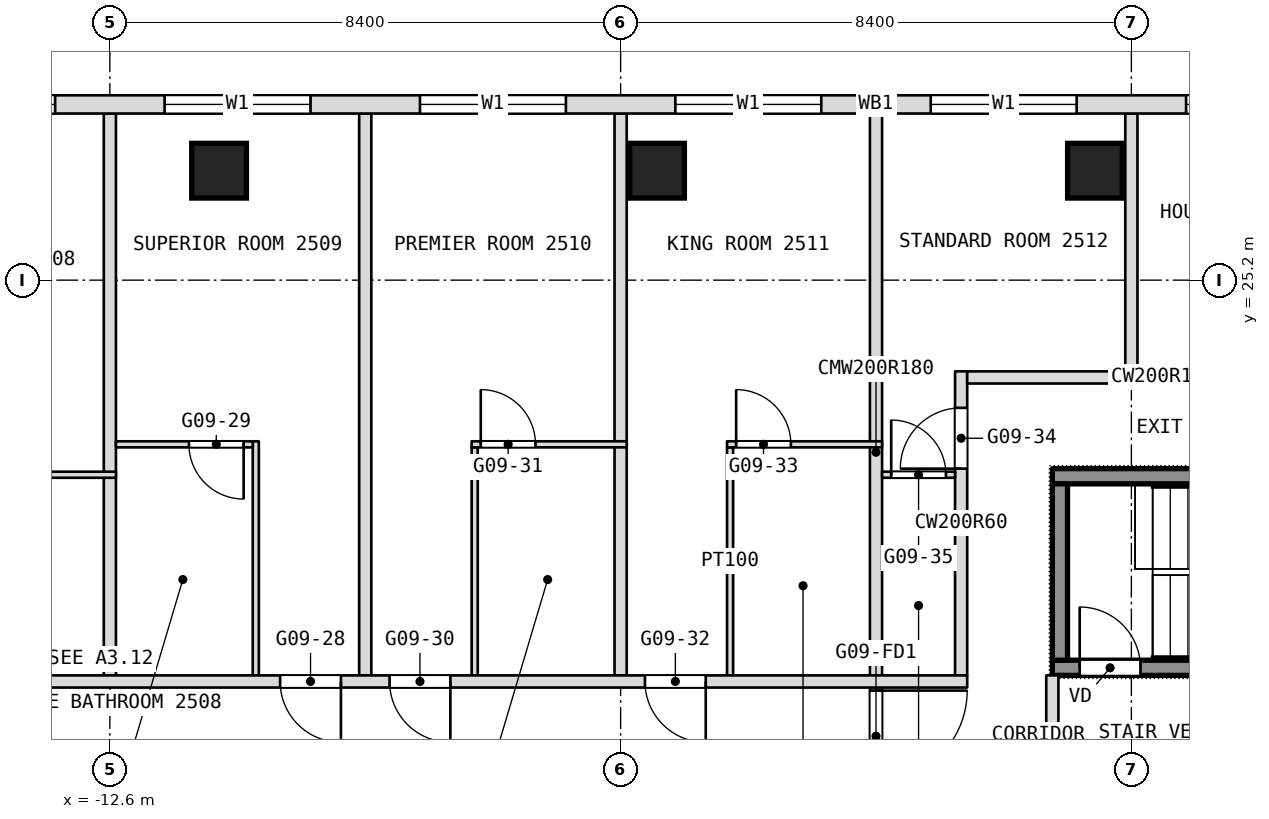
"""IFC4 building model, lengths in metres.
Left out: names, types, materials, properties, quantities, classifications, styles, units other than length and angle.
Written with IfcOpenShell. Run it as: python <this file> out.ifc"""

import sys

from ifc_helpers import new_model, si_unit, direction, frame, frame_2d, origin, origin_2d, place, context, subcontext, project, spatial, rectangle, extrude, element, fill, save


model = new_model("IFC4")
c1 = context("Model", 3, precision=1e-05, world=origin(), true_north=direction((0.0, 1.0)))
c2 = subcontext(c1, "Body", "Model", "MODEL_VIEW")
j1 = project(units=[si_unit("LENGTHUNIT", "METRE"), si_unit("PLANEANGLEUNIT", "RADIAN")], contexts=[c1])
p1 = place(None, origin())
s1 = spatial("IfcSite", under=j1, at=p1, CompositionType="ELEMENT")
p2 = place(p1, origin())
s2 = spatial("IfcBuilding", under=s1, at=p2, CompositionType="ELEMENT")
p3 = place(p2, frame((0.0, 0.0, 115.7)))
s3 = spatial("IfcBuildingStorey", under=s2, at=p3, CompositionType="ELEMENT", Elevation=115.7)
for number, where, z_axis, x_axis in (
    (1, (-10.804, 27.0, 0.0), (0.0, 0.0, 1.0), (1.0, 0.0, 0.0)),
    (2, (-3.601, 27.0, 0.0), (0.0, 0.0, 1.0), (1.0, 0.0, 0.0)),
    (3, (3.601, 27.0, 0.0), (0.0, 0.0, 1.0), (1.0, 0.0, 0.0)),
):
    element("IfcColumn", number, at=place(p3, frame(where, z_axis=z_axis, x_axis=x_axis)), inside=s3, PredefinedType="COLUMN", context=c2, shape_type="SweptSolid", body=[
        extrude(rectangle(XDim=0.9, YDim=0.9, at=origin_2d()), origin(), (0.0, 0.0, 1.0), 3.6),
    ])
p4 = place(p3, frame((4.2, 23.7, 0.0), z_axis=(0.0, 0.0, 1.0), x_axis=(0.0, 1.0, 0.0)))
e4 = element("IfcWall", 4, at=p4, inside=s3, PredefinedType="PARTITIONING", context=c2, shape_type="SweptSolid", body=[
    extrude(rectangle(XDim=4.24, YDim=0.2, at=frame_2d((2.12, 0.0))), origin(), (0.0, 0.0, 1.0), 3.34),
])
p5 = place(p3, frame((2.9, 16.9, 0.0), z_axis=(0.0, 0.0, 1.0), x_axis=(0.0, 1.0, 0.0)))
e5 = element("IfcWall", 5, at=p5, inside=s3, PredefinedType="PARTITIONING", context=c2, shape_type="SweptSolid", body=[
    extrude(rectangle(XDim=1.8, YDim=0.2, at=frame_2d((0.9, 0.0))), origin(), (0.0, 0.0, 1.0), 3.34),
])
p6 = place(p3, frame((1.4, 18.7, 0.0), z_axis=(0.0, 0.0, 1.0), x_axis=(0.0, 1.0, 0.0)))
e6 = element("IfcWall", 6, at=p6, inside=s3, PredefinedType="PARTITIONING", context=c2, shape_type="SweptSolid", body=[
    extrude(rectangle(XDim=5.0, YDim=0.2, at=frame_2d((2.5, 0.0))), origin(), (0.0, 0.0, 1.0), 3.34),
])
p7 = place(p6, frame((3.4, 0.0, 0.0)))
e7 = element("IfcOpeningElement", 7, at=p7, cuts=e6, PredefinedType="OPENING", context=c2, shape_type="SweptSolid", body=[
    extrude(rectangle(XDim=1.0, YDim=2.1, at=frame_2d((0.5, 1.05))), frame((0.0, 0.1, 0.0), z_axis=(0.0, -1.0, 0.0), x_axis=(1.0, 0.0, 0.0)), (0.0, 0.0, 1.0), 0.2),
])
p8 = place(p3, frame((0.0, 16.8, 0.0), z_axis=(0.0, 0.0, 1.0), x_axis=(0.0, 1.0, 0.0)))
e8 = element("IfcWall", 8, at=p8, inside=s3, PredefinedType="PARTITIONING", context=c2, shape_type="SweptSolid", body=[
    extrude(rectangle(XDim=11.14, YDim=0.2, at=frame_2d((5.57, 0.0))), origin(), (0.0, 0.0, 1.0), 3.34),
])
p9 = place(p8, frame((0.15, 0.0, 0.0)))
e9 = element("IfcOpeningElement", 9, at=p9, cuts=e8, PredefinedType="OPENING", context=c2, shape_type="SweptSolid", body=[
    extrude(rectangle(XDim=1.5, YDim=2.1, at=frame_2d((0.75, 1.05))), frame((0.0, 0.1, 0.0), z_axis=(0.0, -1.0, 0.0), x_axis=(1.0, 0.0, 0.0)), (0.0, 0.0, 1.0), 0.2),
])
p10 = place(p3, frame((-2.4, 18.7, 0.0), z_axis=(0.0, 0.0, 1.0), x_axis=(0.0, 1.0, 0.0)))
e10 = element("IfcWall", 10, at=p10, inside=s3, PredefinedType="PARTITIONING", context=c2, shape_type="SweptSolid", body=[
    extrude(rectangle(XDim=3.75, YDim=0.1, at=frame_2d((1.875, 0.0))), origin(), (0.0, 0.0, 1.0), 3.34),
])
p11 = place(p3, frame((-4.2, 18.7, 0.0), z_axis=(0.0, 0.0, 1.0), x_axis=(0.0, 1.0, 0.0)))
e11 = element("IfcWall", 11, at=p11, inside=s3, PredefinedType="PARTITIONING", context=c2, shape_type="SweptSolid", body=[
    extrude(rectangle(XDim=9.24, YDim=0.2, at=frame_2d((4.62, 0.0))), origin(), (0.0, 0.0, 1.0), 3.34),
])
p12 = place(p3, frame((-6.6, 18.7, 0.0), z_axis=(0.0, 0.0, 1.0), x_axis=(0.0, 1.0, 0.0)))
e12 = element("IfcWall", 12, at=p12, inside=s3, PredefinedType="PARTITIONING", context=c2, shape_type="SweptSolid", body=[
    extrude(rectangle(XDim=3.75, YDim=0.1, at=frame_2d((1.875, 0.0))), origin(), (0.0, 0.0, 1.0), 3.34),
])
p13 = place(p3, frame((-8.4, 18.7, 0.0), z_axis=(0.0, 0.0, 1.0), x_axis=(0.0, 1.0, 0.0)))
e13 = element("IfcWall", 13, at=p13, inside=s3, PredefinedType="PARTITIONING", context=c2, shape_type="SweptSolid", body=[
    extrude(rectangle(XDim=9.24, YDim=0.2, at=frame_2d((4.62, 0.0))), origin(), (0.0, 0.0, 1.0), 3.34),
])
p14 = place(p3, frame((-10.2, 18.7, 0.0), z_axis=(0.0, 0.0, 1.0), x_axis=(0.0, 1.0, 0.0)))
e14 = element("IfcWall", 14, at=p14, inside=s3, PredefinedType="PARTITIONING", context=c2, shape_type="SweptSolid", body=[
    extrude(rectangle(XDim=3.85, YDim=0.1, at=frame_2d((1.925, 0.0))), origin(), (0.0, 0.0, 1.0), 3.34),
])
p15 = place(p3, frame((-12.6, 18.7, 0.0), z_axis=(0.0, 0.0, 1.0), x_axis=(0.0, 1.0, 0.0)))
e15 = element("IfcWall", 15, at=p15, inside=s3, PredefinedType="PARTITIONING", context=c2, shape_type="SweptSolid", body=[
    extrude(rectangle(XDim=9.24, YDim=0.2, at=frame_2d((4.62, 0.0))), origin(), (0.0, 0.0, 1.0), 3.34),
])
p16 = place(p3, frame((-16.9, 18.6, 0.0), z_axis=(0.0, 0.0, 1.0), x_axis=(1.0, 0.0, 0.0)))
e16 = element("IfcWall", 16, at=p16, inside=s3, PredefinedType="PARTITIONING", context=c2, shape_type="SweptSolid", body=[
    extrude(rectangle(XDim=18.4, YDim=0.2, at=frame_2d((9.2, 0.0))), origin(), (0.0, 0.0, 1.0), 3.34),
])
p17 = place(p16, frame((0.5, 0.0, 0.0)))
e17 = element("IfcOpeningElement", 17, at=p17, cuts=e16, PredefinedType="OPENING", context=c2, shape_type="SweptSolid", body=[
    extrude(rectangle(XDim=1.0, YDim=2.1, at=frame_2d((0.5, 1.05))), frame((0.0, 0.1, 0.0), z_axis=(0.0, -1.0, 0.0), x_axis=(1.0, 0.0, 0.0)), (0.0, 0.0, 1.0), 0.2),
])
p18 = place(p16, frame((7.1, 0.0, 0.0)))
e18 = element("IfcOpeningElement", 18, at=p18, cuts=e16, PredefinedType="OPENING", context=c2, shape_type="SweptSolid", body=[
    extrude(rectangle(XDim=1.0, YDim=2.1, at=frame_2d((0.5, 1.05))), frame((0.0, 0.1, 0.0), z_axis=(0.0, -1.0, 0.0), x_axis=(1.0, 0.0, 0.0)), (0.0, 0.0, 1.0), 0.2),
])
p19 = place(p16, frame((8.9, 0.0, 0.0)))
e19 = element("IfcOpeningElement", 19, at=p19, cuts=e16, PredefinedType="OPENING", context=c2, shape_type="SweptSolid", body=[
    extrude(rectangle(XDim=1.0, YDim=2.1, at=frame_2d((0.5, 1.05))), frame((0.0, 0.1, 0.0), z_axis=(0.0, -1.0, 0.0), x_axis=(1.0, 0.0, 0.0)), (0.0, 0.0, 1.0), 0.2),
])
p20 = place(p16, frame((13.1, 0.0, 0.0)))
e20 = element("IfcOpeningElement", 20, at=p20, cuts=e16, PredefinedType="OPENING", context=c2, shape_type="SweptSolid", body=[
    extrude(rectangle(XDim=1.0, YDim=2.1, at=frame_2d((0.5, 1.05))), frame((0.0, 0.1, 0.0), z_axis=(0.0, -1.0, 0.0), x_axis=(1.0, 0.0, 0.0)), (0.0, 0.0, 1.0), 0.2),
])
p21 = place(p3, frame((-15.05, 22.0, 0.0), z_axis=(0.0, 0.0, 1.0), x_axis=(1.0, 0.0, 0.0)))
e21 = element("IfcWall", 21, at=p21, inside=s3, PredefinedType="PARTITIONING", context=c2, shape_type="SweptSolid", body=[
    extrude(rectangle(XDim=2.55, YDim=0.1, at=frame_2d((1.275, 0.0))), origin(), (0.0, 0.0, 1.0), 3.34),
])
p22 = place(p21, frame((0.15, 0.0, 0.0)))
e22 = element("IfcOpeningElement", 22, at=p22, cuts=e21, PredefinedType="OPENING", context=c2, shape_type="SweptSolid", body=[
    extrude(rectangle(XDim=0.9, YDim=2.1, at=frame_2d((0.45, 1.05))), frame((0.0, 0.05, 0.0), z_axis=(0.0, -1.0, 0.0), x_axis=(1.0, 0.0, 0.0)), (0.0, 0.0, 1.0), 0.1),
])
p23 = place(p3, frame((0.1, 22.0, 0.0), z_axis=(0.0, 0.0, 1.0), x_axis=(1.0, 0.0, 0.0)))
e23 = element("IfcWall", 23, at=p23, inside=s3, PredefinedType="PARTITIONING", context=c2, shape_type="SweptSolid", body=[
    extrude(rectangle(XDim=1.2, YDim=0.1, at=frame_2d((0.6, 0.0))), origin(), (0.0, 0.0, 1.0), 3.34),
])
p24 = place(p23, frame((0.15, 0.0, 0.0)))
e24 = element("IfcOpeningElement", 24, at=p24, cuts=e23, PredefinedType="OPENING", context=c2, shape_type="SweptSolid", body=[
    extrude(rectangle(XDim=0.9, YDim=2.1, at=frame_2d((0.45, 1.05))), frame((0.0, 0.05, 0.0), z_axis=(0.0, -1.0, 0.0), x_axis=(1.0, 0.0, 0.0)), (0.0, 0.0, 1.0), 0.1),
])
p25 = place(p3, frame((-12.5, 22.5, 0.0), z_axis=(0.0, 0.0, 1.0), x_axis=(1.0, 0.0, 0.0)))
e25 = element("IfcWall", 25, at=p25, inside=s3, PredefinedType="PARTITIONING", context=c2, shape_type="SweptSolid", body=[
    extrude(rectangle(XDim=2.25, YDim=0.1, at=frame_2d((1.125, 0.0))), origin(), (0.0, 0.0, 1.0), 3.34),
])
p26 = place(p25, frame((1.2, 0.0, 0.0)))
e26 = element("IfcOpeningElement", 26, at=p26, cuts=e25, PredefinedType="OPENING", context=c2, shape_type="SweptSolid", body=[
    extrude(rectangle(XDim=0.9, YDim=2.1, at=frame_2d((0.45, 1.05))), frame((0.0, 0.05, 0.0), z_axis=(0.0, -1.0, 0.0), x_axis=(1.0, 0.0, 0.0)), (0.0, 0.0, 1.0), 0.1),
])
p27 = place(p3, frame((-6.65, 22.5, 0.0), z_axis=(0.0, 0.0, 1.0), x_axis=(1.0, 0.0, 0.0)))
e27 = element("IfcWall", 27, at=p27, inside=s3, PredefinedType="PARTITIONING", context=c2, shape_type="SweptSolid", body=[
    extrude(rectangle(XDim=2.55, YDim=0.1, at=frame_2d((1.275, 0.0))), origin(), (0.0, 0.0, 1.0), 3.34),
])
p28 = place(p27, frame((0.15, 0.0, 0.0)))
e28 = element("IfcOpeningElement", 28, at=p28, cuts=e27, PredefinedType="OPENING", context=c2, shape_type="SweptSolid", body=[
    extrude(rectangle(XDim=0.9, YDim=2.1, at=frame_2d((0.45, 1.05))), frame((0.0, 0.05, 0.0), z_axis=(0.0, -1.0, 0.0), x_axis=(1.0, 0.0, 0.0)), (0.0, 0.0, 1.0), 0.1),
])
p29 = place(p3, frame((-2.45, 22.5, 0.0), z_axis=(0.0, 0.0, 1.0), x_axis=(1.0, 0.0, 0.0)))
e29 = element("IfcWall", 29, at=p29, inside=s3, PredefinedType="PARTITIONING", context=c2, shape_type="SweptSolid", body=[
    extrude(rectangle(XDim=2.55, YDim=0.1, at=frame_2d((1.275, 0.0))), origin(), (0.0, 0.0, 1.0), 3.34),
])
p30 = place(p29, frame((0.15, 0.0, 0.0)))
e30 = element("IfcOpeningElement", 30, at=p30, cuts=e29, PredefinedType="OPENING", context=c2, shape_type="SweptSolid", body=[
    extrude(rectangle(XDim=0.9, YDim=2.1, at=frame_2d((0.45, 1.05))), frame((0.0, 0.05, 0.0), z_axis=(0.0, -1.0, 0.0), x_axis=(1.0, 0.0, 0.0)), (0.0, 0.0, 1.0), 0.1),
])
p31 = place(p3, frame((1.5, 23.6, 0.0), z_axis=(0.0, 0.0, 1.0), x_axis=(1.0, 0.0, 0.0)))
e31 = element("IfcWall", 31, at=p31, inside=s3, PredefinedType="PARTITIONING", context=c2, shape_type="SweptSolid", body=[
    extrude(rectangle(XDim=9.2, YDim=0.2, at=frame_2d((4.6, 0.0))), origin(), (0.0, 0.0, 1.0), 3.34),
])
p32 = place(p31, frame((4.3, 0.0, 0.0)))
e32 = element("IfcOpeningElement", 32, at=p32, cuts=e31, PredefinedType="OPENING", context=c2, shape_type="SweptSolid", body=[
    extrude(rectangle(XDim=1.0, YDim=2.1, at=frame_2d((0.5, 1.05))), frame((0.0, 0.1, 0.0), z_axis=(0.0, -1.0, 0.0), x_axis=(1.0, 0.0, 0.0)), (0.0, 0.0, 1.0), 0.2),
])
p33 = place(p3, frame((21.306, 28.09, 0.0), z_axis=(0.0, 0.0, 1.0), x_axis=(-1.0, 0.0, 0.0)))
e33 = element("IfcWall", 33, at=p33, inside=s3, PredefinedType="NOTDEFINED", context=c2, shape_type="SweptSolid", body=[
    extrude(rectangle(XDim=42.612, YDim=0.3, at=frame_2d((21.306, 0.0))), origin(), (0.0, 0.0, 1.0), 3.6),
])
p34 = place(p33, frame((5.406, 0.0, 0.9)))
e34 = element("IfcOpeningElement", 34, at=p34, cuts=e33, PredefinedType="OPENING", context=c2, shape_type="SweptSolid", body=[
    extrude(rectangle(XDim=2.4, YDim=2.1, at=frame_2d((1.2, 1.05))), frame((0.0, 0.15, 0.0), z_axis=(0.0, -1.0, 0.0), x_axis=(1.0, 0.0, 0.0)), (0.0, 0.0, 1.0), 0.3),
])
p35 = place(p33, frame((9.606, 0.0, 0.9)))
e35 = element("IfcOpeningElement", 35, at=p35, cuts=e33, PredefinedType="OPENING", context=c2, shape_type="SweptSolid", body=[
    extrude(rectangle(XDim=2.4, YDim=2.1, at=frame_2d((1.2, 1.05))), frame((0.0, 0.15, 0.0), z_axis=(0.0, -1.0, 0.0), x_axis=(1.0, 0.0, 0.0)), (0.0, 0.0, 1.0), 0.3),
])
p36 = place(p33, frame((13.806, 0.0, 0.9)))
e36 = element("IfcOpeningElement", 36, at=p36, cuts=e33, PredefinedType="OPENING", context=c2, shape_type="SweptSolid", body=[
    extrude(rectangle(XDim=2.4, YDim=2.1, at=frame_2d((1.2, 1.05))), frame((0.0, 0.15, 0.0), z_axis=(0.0, -1.0, 0.0), x_axis=(1.0, 0.0, 0.0)), (0.0, 0.0, 1.0), 0.3),
])
p37 = place(p33, frame((18.006, 0.0, 0.9)))
e37 = element("IfcOpeningElement", 37, at=p37, cuts=e33, PredefinedType="OPENING", context=c2, shape_type="SweptSolid", body=[
    extrude(rectangle(XDim=2.4, YDim=2.1, at=frame_2d((1.2, 1.05))), frame((0.0, 0.15, 0.0), z_axis=(0.0, -1.0, 0.0), x_axis=(1.0, 0.0, 0.0)), (0.0, 0.0, 1.0), 0.3),
])
p38 = place(p33, frame((22.206, 0.0, 0.9)))
e38 = element("IfcOpeningElement", 38, at=p38, cuts=e33, PredefinedType="OPENING", context=c2, shape_type="SweptSolid", body=[
    extrude(rectangle(XDim=2.4, YDim=2.1, at=frame_2d((1.2, 1.05))), frame((0.0, 0.15, 0.0), z_axis=(0.0, -1.0, 0.0), x_axis=(1.0, 0.0, 0.0)), (0.0, 0.0, 1.0), 0.3),
])
p39 = place(p33, frame((26.406, 0.0, 0.9)))
e39 = element("IfcOpeningElement", 39, at=p39, cuts=e33, PredefinedType="OPENING", context=c2, shape_type="SweptSolid", body=[
    extrude(rectangle(XDim=2.4, YDim=2.1, at=frame_2d((1.2, 1.05))), frame((0.0, 0.15, 0.0), z_axis=(0.0, -1.0, 0.0), x_axis=(1.0, 0.0, 0.0)), (0.0, 0.0, 1.0), 0.3),
])
p40 = place(p33, frame((30.606, 0.0, 0.9)))
e40 = element("IfcOpeningElement", 40, at=p40, cuts=e33, PredefinedType="OPENING", context=c2, shape_type="SweptSolid", body=[
    extrude(rectangle(XDim=2.4, YDim=2.1, at=frame_2d((1.2, 1.05))), frame((0.0, 0.15, 0.0), z_axis=(0.0, -1.0, 0.0), x_axis=(1.0, 0.0, 0.0)), (0.0, 0.0, 1.0), 0.3),
])
p41 = place(p33, frame((34.806, 0.0, 0.9)))
e41 = element("IfcOpeningElement", 41, at=p41, cuts=e33, PredefinedType="OPENING", context=c2, shape_type="SweptSolid", body=[
    extrude(rectangle(XDim=2.4, YDim=2.1, at=frame_2d((1.2, 1.05))), frame((0.0, 0.15, 0.0), z_axis=(0.0, -1.0, 0.0), x_axis=(1.0, 0.0, 0.0)), (0.0, 0.0, 1.0), 0.3),
])
p42 = place(p3, frame((2.9, 18.825, 0.1), z_axis=(0.0, 0.0, 1.0), x_axis=(1.0, 0.0, 0.0)))
e42 = element("IfcWall", 42, at=p42, inside=s3, PredefinedType="SHEAR", context=c2, shape_type="SweptSolid", body=[
    extrude(rectangle(XDim=6.2, YDim=0.25, at=frame_2d((3.1, 0.0))), origin(), (0.0, 0.0, 1.0), 3.6),
])
p43 = place(p42, frame((0.45, 0.0, 0.0)))
e43 = element("IfcOpeningElement", 43, at=p43, cuts=e42, PredefinedType="OPENING", context=c2, shape_type="SweptSolid", body=[
    extrude(rectangle(XDim=1.0, YDim=2.1, at=frame_2d((0.5, 1.05))), frame((0.0, 0.125, 0.0), z_axis=(0.0, -1.0, 0.0), x_axis=(1.0, 0.0, 0.0)), (0.0, 0.0, 1.0), 0.25),
])
p44 = place(p3, frame((2.9, 21.975, 0.1), z_axis=(0.0, 0.0, 1.0), x_axis=(1.0, 0.0, 0.0)))
e44 = element("IfcWall", 44, at=p44, inside=s3, PredefinedType="SHEAR", context=c2, shape_type="SweptSolid", body=[
    extrude(rectangle(XDim=6.2, YDim=0.25, at=frame_2d((3.1, 0.0))), origin(), (0.0, 0.0, 1.0), 3.6),
])
p45 = place(p3, frame((3.025, 18.95, 0.1), z_axis=(0.0, 0.0, 1.0), x_axis=(0.0, 1.0, 0.0)))
e45 = element("IfcWall", 45, at=p45, inside=s3, PredefinedType="SHEAR", context=c2, shape_type="SweptSolid", body=[
    extrude(rectangle(XDim=2.9, YDim=0.25, at=frame_2d((1.45, 0.0))), origin(), (0.0, 0.0, 1.0), 3.6),
])
p46 = place(p7, origin())
e46 = element("IfcDoor", 46, at=p46, inside=s3, OperationType="SINGLE_SWING_RIGHT", PredefinedType="DOOR", context=c2, shape_type="SweptSolid", body=[
    extrude(rectangle(XDim=1.0, YDim=2.1, at=frame_2d((0.5, 1.05))), frame((0.0, 0.025, 0.0), z_axis=(0.0, -1.0, 0.0), x_axis=(1.0, 0.0, 0.0)), (0.0, 0.0, 1.0), 0.05),
])
fill(e7, e46)
p47 = place(p18, origin())
e47 = element("IfcDoor", 47, at=p47, inside=s3, OperationType="SINGLE_SWING_LEFT", PredefinedType="DOOR", context=c2, shape_type="SweptSolid", body=[
    extrude(rectangle(XDim=1.0, YDim=2.1, at=frame_2d((0.5, 1.05))), frame((0.0, 0.025, 0.0), z_axis=(0.0, -1.0, 0.0), x_axis=(1.0, 0.0, 0.0)), (0.0, 0.0, 1.0), 0.05),
])
fill(e18, e47)
p48 = place(p19, origin())
e48 = element("IfcDoor", 48, at=p48, inside=s3, OperationType="SINGLE_SWING_LEFT", PredefinedType="DOOR", context=c2, shape_type="SweptSolid", body=[
    extrude(rectangle(XDim=1.0, YDim=2.1, at=frame_2d((0.5, 1.05))), frame((0.0, 0.025, 0.0), z_axis=(0.0, -1.0, 0.0), x_axis=(1.0, 0.0, 0.0)), (0.0, 0.0, 1.0), 0.05),
])
fill(e19, e48)
p49 = place(p20, origin())
e49 = element("IfcDoor", 49, at=p49, inside=s3, OperationType="SINGLE_SWING_LEFT", PredefinedType="DOOR", context=c2, shape_type="SweptSolid", body=[
    extrude(rectangle(XDim=1.0, YDim=2.1, at=frame_2d((0.5, 1.05))), frame((0.0, 0.025, 0.0), z_axis=(0.0, -1.0, 0.0), x_axis=(1.0, 0.0, 0.0)), (0.0, 0.0, 1.0), 0.05),
])
fill(e20, e49)
p50 = place(p24, origin())
e50 = element("IfcDoor", 50, at=p50, inside=s3, OperationType="SINGLE_SWING_LEFT", PredefinedType="DOOR", context=c2, shape_type="SweptSolid", body=[
    extrude(rectangle(XDim=0.9, YDim=2.1, at=frame_2d((0.45, 1.05))), frame((0.0, 0.025, 0.0), z_axis=(0.0, -1.0, 0.0), x_axis=(1.0, 0.0, 0.0)), (0.0, 0.0, 1.0), 0.05),
])
fill(e24, e50)
p51 = place(p26, origin())
e51 = element("IfcDoor", 51, at=p51, inside=s3, OperationType="SINGLE_SWING_LEFT", PredefinedType="DOOR", context=c2, shape_type="SweptSolid", body=[
    extrude(rectangle(XDim=0.9, YDim=2.1, at=frame_2d((0.45, 1.05))), frame((0.0, 0.025, 0.0), z_axis=(0.0, -1.0, 0.0), x_axis=(1.0, 0.0, 0.0)), (0.0, 0.0, 1.0), 0.05),
])
fill(e26, e51)
p52 = place(p28, origin())
e52 = element("IfcDoor", 52, at=p52, inside=s3, OperationType="SINGLE_SWING_RIGHT", PredefinedType="DOOR", context=c2, shape_type="SweptSolid", body=[
    extrude(rectangle(XDim=0.9, YDim=2.1, at=frame_2d((0.45, 1.05))), frame((0.0, 0.025, 0.0), z_axis=(0.0, -1.0, 0.0), x_axis=(1.0, 0.0, 0.0)), (0.0, 0.0, 1.0), 0.05),
])
fill(e28, e52)
p53 = place(p30, origin())
e53 = element("IfcDoor", 53, at=p53, inside=s3, OperationType="SINGLE_SWING_RIGHT", PredefinedType="DOOR", context=c2, shape_type="SweptSolid", body=[
    extrude(rectangle(XDim=0.9, YDim=2.1, at=frame_2d((0.45, 1.05))), frame((0.0, 0.025, 0.0), z_axis=(0.0, -1.0, 0.0), x_axis=(1.0, 0.0, 0.0)), (0.0, 0.0, 1.0), 0.05),
])
fill(e30, e53)
p54 = place(p36, origin())
e54 = element("IfcWindow", 54, at=p54, inside=s3, PartitioningType="SINGLE_PANEL", PredefinedType="WINDOW", context=c2, shape_type="SweptSolid", body=[
    extrude(rectangle(XDim=2.4, YDim=2.1, at=frame_2d((1.2, 1.05))), frame((0.0, 0.03, 0.0), z_axis=(0.0, -1.0, 0.0), x_axis=(1.0, 0.0, 0.0)), (0.0, 0.0, 1.0), 0.06),
])
fill(e36, e54)
p55 = place(p37, origin())
e55 = element("IfcWindow", 55, at=p55, inside=s3, PartitioningType="SINGLE_PANEL", PredefinedType="WINDOW", context=c2, shape_type="SweptSolid", body=[
    extrude(rectangle(XDim=2.4, YDim=2.1, at=frame_2d((1.2, 1.05))), frame((0.0, 0.03, 0.0), z_axis=(0.0, -1.0, 0.0), x_axis=(1.0, 0.0, 0.0)), (0.0, 0.0, 1.0), 0.06),
])
fill(e37, e55)
p56 = place(p38, origin())
e56 = element("IfcWindow", 56, at=p56, inside=s3, PartitioningType="SINGLE_PANEL", PredefinedType="WINDOW", context=c2, shape_type="SweptSolid", body=[
    extrude(rectangle(XDim=2.4, YDim=2.1, at=frame_2d((1.2, 1.05))), frame((0.0, 0.03, 0.0), z_axis=(0.0, -1.0, 0.0), x_axis=(1.0, 0.0, 0.0)), (0.0, 0.0, 1.0), 0.06),
])
fill(e38, e56)
p57 = place(p39, origin())
e57 = element("IfcWindow", 57, at=p57, inside=s3, PartitioningType="SINGLE_PANEL", PredefinedType="WINDOW", context=c2, shape_type="SweptSolid", body=[
    extrude(rectangle(XDim=2.4, YDim=2.1, at=frame_2d((1.2, 1.05))), frame((0.0, 0.03, 0.0), z_axis=(0.0, -1.0, 0.0), x_axis=(1.0, 0.0, 0.0)), (0.0, 0.0, 1.0), 0.06),
])
fill(e39, e57)
p58 = place(p40, origin())
e58 = element("IfcWindow", 58, at=p58, inside=s3, PartitioningType="SINGLE_PANEL", PredefinedType="WINDOW", context=c2, shape_type="SweptSolid", body=[
    extrude(rectangle(XDim=2.4, YDim=2.1, at=frame_2d((1.2, 1.05))), frame((0.0, 0.03, 0.0), z_axis=(0.0, -1.0, 0.0), x_axis=(1.0, 0.0, 0.0)), (0.0, 0.0, 1.0), 0.06),
])
fill(e40, e58)
p59 = place(p41, origin())
e59 = element("IfcWindow", 59, at=p59, inside=s3, PartitioningType="SINGLE_PANEL", PredefinedType="WINDOW", context=c2, shape_type="SweptSolid", body=[
    extrude(rectangle(XDim=2.4, YDim=2.1, at=frame_2d((1.2, 1.05))), frame((0.0, 0.03, 0.0), z_axis=(0.0, -1.0, 0.0), x_axis=(1.0, 0.0, 0.0)), (0.0, 0.0, 1.0), 0.06),
])
fill(e41, e59)
p60 = place(p43, origin())
e60 = element("IfcDoor", 60, at=p60, inside=s3, OperationType="SINGLE_SWING_LEFT", PredefinedType="DOOR", context=c2, shape_type="SweptSolid", body=[
    extrude(rectangle(XDim=1.0, YDim=2.1, at=frame_2d((0.5, 1.05))), frame((0.0, 0.025, 0.0), z_axis=(0.0, -1.0, 0.0), x_axis=(1.0, 0.0, 0.0)), (0.0, 0.0, 1.0), 0.05),
])
fill(e43, e60)
p61 = place(p9, origin())
e61 = element("IfcDoor", 61, at=p61, inside=s3, OperationType="DOUBLE_DOOR_DOUBLE_SWING", PredefinedType="DOOR", context=c2, shape_type="SweptSolid", body=[
    extrude(rectangle(XDim=1.5, YDim=2.1, at=frame_2d((0.75, 1.05))), frame((0.0, 0.025, 0.0), z_axis=(0.0, -1.0, 0.0), x_axis=(1.0, 0.0, 0.0)), (0.0, 0.0, 1.0), 0.05),
])
fill(e9, e61)
save(model, sys.argv[1])
